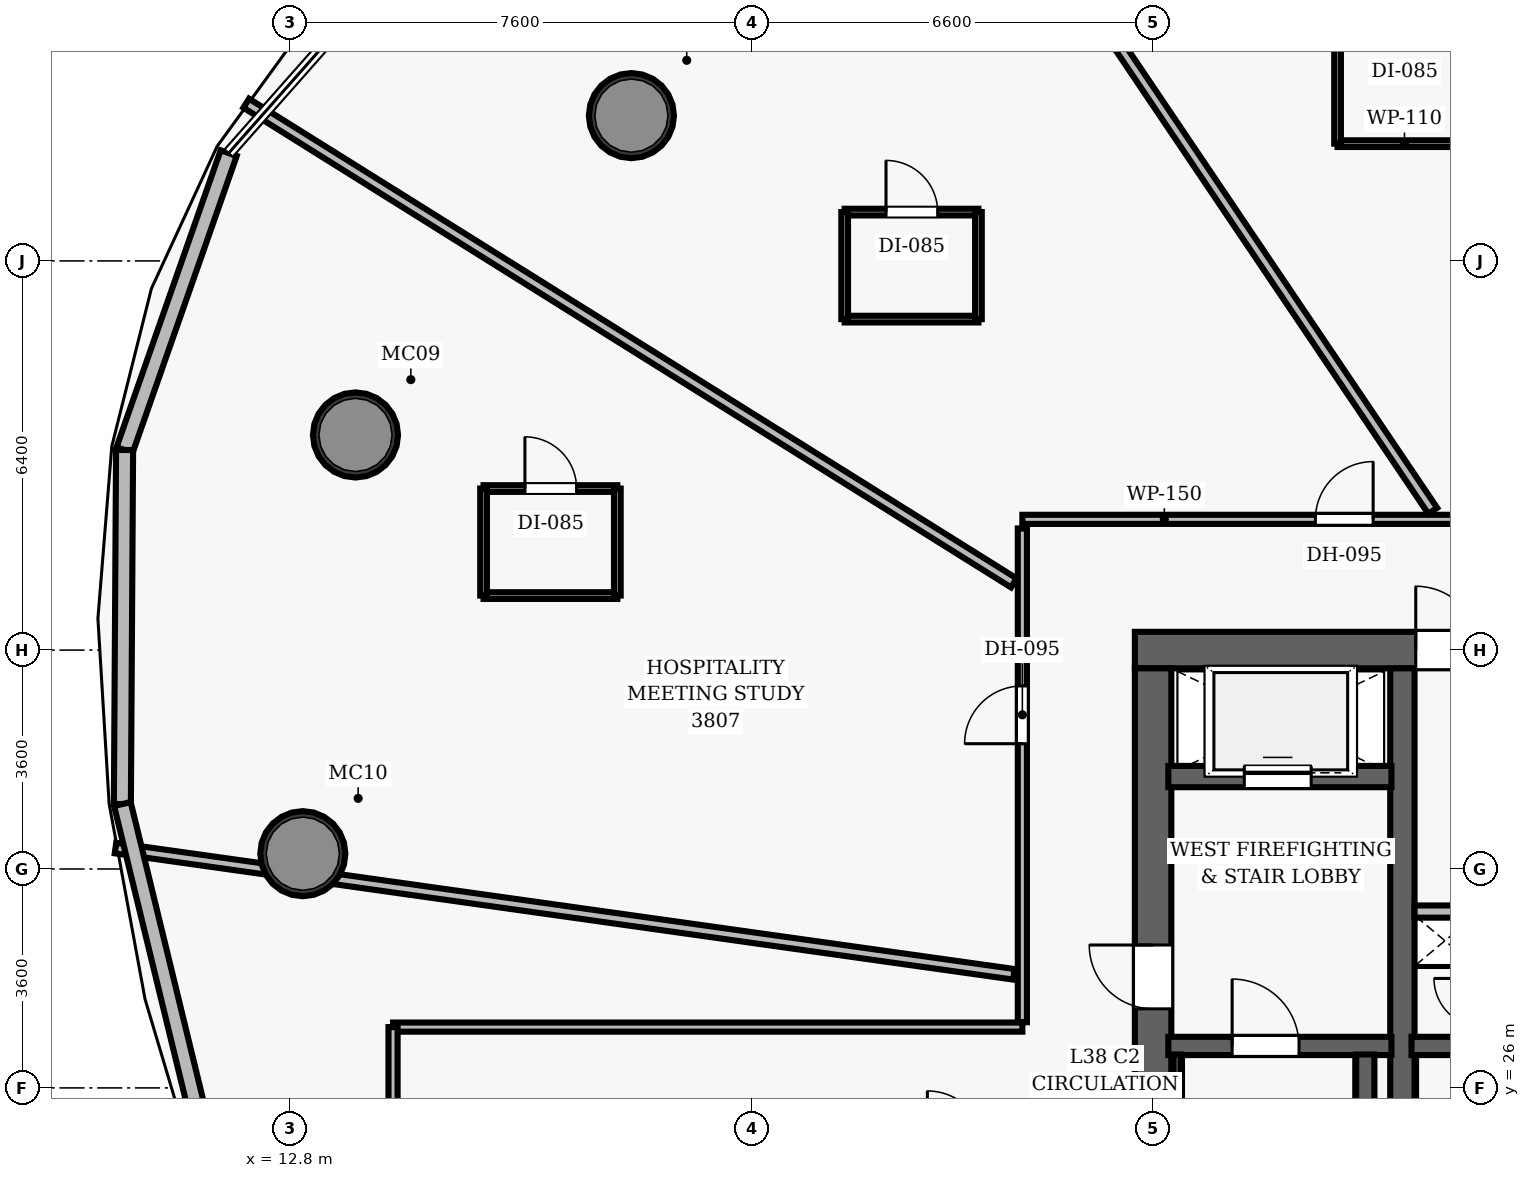
"""IFC4 building model, lengths in metres.
Left out: names, types, materials, properties, quantities, classifications, styles, units other than length and angle.
Written with IfcOpenShell. Run it as: python <this file> out.ifc"""

import sys

from ifc_helpers import new_model, si_unit, direction, frame, frame_2d, origin, origin_2d, place, context, subcontext, project, spatial, rectangle, hollow_circle, extrude, element, fill, save


model = new_model("IFC4")
c1 = context("Model", 3, precision=1e-05, world=origin(), true_north=direction((0.0, 1.0)))
c2 = subcontext(c1, "Body", "Model", "MODEL_VIEW")
j1 = project(units=[si_unit("LENGTHUNIT", "METRE"), si_unit("PLANEANGLEUNIT", "RADIAN")], contexts=[c1])
p1 = place(None, origin())
s1 = spatial("IfcSite", under=j1, at=p1, CompositionType="ELEMENT")
p2 = place(p1, origin())
s2 = spatial("IfcBuilding", under=s1, at=p2, CompositionType="ELEMENT")
p3 = place(p2, frame((0.0, 0.0, 151.8)))
s3 = spatial("IfcBuildingStorey", under=s2, at=p3, CompositionType="ELEMENT", Elevation=151.8)
p4 = place(p3, frame((26.7, 33.2, 0.0), z_axis=(0.0, 0.0, 1.0), x_axis=(1.0, 0.0, 0.0)))
e1 = element("IfcWall", 1, at=p4, inside=s3, PredefinedType="SHEAR", context=c2, shape_type="SweptSolid", body=[
    extrude(rectangle(XDim=22.6, YDim=0.6, at=frame_2d((11.3, 0.0))), origin(), (0.0, 0.0, 1.0), 3.5),
])
p5 = place(p4, frame((4.62, 0.0, 0.0)))
e2 = element("IfcOpeningElement", 2, at=p5, cuts=e1, PredefinedType="OPENING", context=c2, shape_type="SweptSolid", body=[
    extrude(rectangle(XDim=1.05, YDim=2.15, at=frame_2d((0.525, 1.075))), frame((0.0, 0.31, 0.0), z_axis=(0.0, -1.0, 0.0), x_axis=(1.0, 0.0, 0.0)), (0.0, 0.0, 1.0), 0.62),
])
p6 = place(p4, frame((14.52, 0.0, 0.0)))
e3 = element("IfcOpeningElement", 3, at=p6, cuts=e1, PredefinedType="OPENING", context=c2, shape_type="SweptSolid", body=[
    extrude(rectangle(XDim=1.05, YDim=2.15, at=frame_2d((0.525, 1.075))), frame((0.0, 0.31, 0.0), z_axis=(0.0, -1.0, 0.0), x_axis=(1.0, 0.0, 0.0)), (0.0, 0.0, 1.0), 0.62),
])
p7 = place(p3, frame((27.0, 19.1, 0.0), z_axis=(0.0, 0.0, 1.0), x_axis=(0.0, 1.0, 0.0)))
e4 = element("IfcWall", 4, at=p7, inside=s3, PredefinedType="SHEAR", context=c2, shape_type="SweptSolid", body=[
    extrude(rectangle(XDim=13.8, YDim=0.6, at=frame_2d((6.9, 0.0))), origin(), (0.0, 0.0, 1.0), 3.5),
])
p8 = place(p7, frame((8.2, 0.0, 0.0)))
e5 = element("IfcOpeningElement", 5, at=p8, cuts=e4, PredefinedType="OPENING", context=c2, shape_type="SweptSolid", body=[
    extrude(rectangle(XDim=1.05, YDim=2.15, at=frame_2d((0.525, 1.075))), frame((0.0, 0.31, 0.0), z_axis=(0.0, -1.0, 0.0), x_axis=(1.0, 0.0, 0.0)), (0.0, 0.0, 1.0), 0.62),
])
p9 = place(p3, frame((31.1, 19.1, 0.0), z_axis=(0.0, 0.0, 1.0), x_axis=(0.0, 1.0, 0.0)))
e6 = element("IfcWall", 6, at=p9, inside=s3, PredefinedType="SHEAR", context=c2, shape_type="SweptSolid", body=[
    extrude(rectangle(XDim=13.8, YDim=0.4, at=frame_2d((6.9, 0.0))), origin(), (0.0, 0.0, 1.0), 3.5),
])
for number, where, z_axis, x_axis in (
    (7, (18.42, 41.989, 0.0), (0.0, 0.0, 1.0), (1.0, 0.0, 0.0)),
    (8, (13.882, 36.738, 0.0), (0.0, 0.0, 1.0), (1.0, 0.0, 0.0)),
    (9, (13.016, 29.852, 0.0), (0.0, 0.0, 1.0), (1.0, 0.0, 0.0)),
):
    element("IfcColumn", number, at=place(p3, frame(where, z_axis=z_axis, x_axis=x_axis)), inside=s3, PredefinedType="COLUMN", context=c2, shape_type="SweptSolid", body=[
        extrude(hollow_circle(Radius=0.7, WallThickness=0.055, at=origin_2d()), origin(), (0.0, 0.0, 1.0), 3.5),
    ])
p10 = place(p3, frame((27.25, 26.69, 0.0), z_axis=(0.0, 0.0, 1.0), x_axis=(1.0, 0.0, 0.0)))
e10 = element("IfcWall", 10, at=p10, inside=s3, PredefinedType="SHEAR", context=c2, shape_type="SweptSolid", body=[
    extrude(rectangle(XDim=3.67, YDim=0.3, at=frame_2d((1.835, 0.0))), origin(), (0.0, 0.0, 1.0), 3.5),
])
p11 = place(p10, frame((1.05, 0.0, 0.0)))
e11 = element("IfcOpeningElement", 11, at=p11, cuts=e10, PredefinedType="OPENING", context=c2, shape_type="SweptSolid", body=[
    extrude(rectangle(XDim=1.1, YDim=2.15, at=frame_2d((0.55, 1.075))), frame((0.0, 0.16, 0.0), z_axis=(0.0, -1.0, 0.0), x_axis=(1.0, 0.0, 0.0)), (0.0, 0.0, 1.0), 0.32),
])
p12 = place(p3, frame((30.49, 19.05, 0.0), z_axis=(0.0, 0.0, 1.0), x_axis=(0.0, 1.0, 0.0)))
e12 = element("IfcWall", 12, at=p12, inside=s3, PredefinedType="SHEAR", context=c2, shape_type="SweptSolid", body=[
    extrude(rectangle(XDim=7.5, YDim=0.3, at=frame_2d((3.75, 0.0))), origin(), (0.0, 0.0, 1.0), 3.5),
])
p13 = place(p3, frame((27.395, 19.1, 0.0), z_axis=(0.0, 0.0, 1.0), x_axis=(0.0, 1.0, 0.0)))
e13 = element("IfcWall", 13, at=p13, inside=s3, PredefinedType="SHEAR", context=c2, shape_type="SweptSolid", body=[
    extrude(rectangle(XDim=7.45, YDim=0.12, at=frame_2d((3.725, 0.0))), origin(), (0.0, 0.0, 1.0), 3.5),
])
p14 = place(p3, frame((27.25, 31.12, 0.0), z_axis=(0.0, 0.0, 1.0), x_axis=(1.0, 0.0, 0.0)))
e14 = element("IfcWall", 14, at=p14, inside=s3, PredefinedType="SHEAR", context=c2, shape_type="SweptSolid", body=[
    extrude(rectangle(XDim=3.67, YDim=0.35, at=frame_2d((1.835, 0.0))), origin(), (0.0, 0.0, 1.0), 2.675),
])
p15 = place(p14, frame((1.25, 0.0, 0.0)))
e15 = element("IfcOpeningElement", 15, at=p15, cuts=e14, PredefinedType="OPENING", context=c2, shape_type="SweptSolid", body=[
    extrude(rectangle(XDim=1.1, YDim=2.15, at=frame_2d((0.55, 1.075))), frame((0.0, 0.185, 0.0), z_axis=(0.0, -1.0, 0.0), x_axis=(1.0, 0.0, 0.0)), (0.0, 0.0, 1.0), 0.37),
])
p16 = place(p3, frame((31.25, 26.69, 0.0), z_axis=(0.0, 0.0, 1.0), x_axis=(1.0, 0.0, 0.0)))
e16 = element("IfcWall", 16, at=p16, inside=s3, PredefinedType="SHEAR", context=c2, shape_type="SweptSolid", body=[
    extrude(rectangle(XDim=3.56, YDim=0.3, at=frame_2d((1.78, 0.0))), origin(), (0.0, 0.0, 1.0), 3.5),
])
p17 = place(p16, frame((1.55, 0.0, 0.0)))
e17 = element("IfcOpeningElement", 17, at=p17, cuts=e16, PredefinedType="OPENING", context=c2, shape_type="SweptSolid", body=[
    extrude(rectangle(XDim=1.1, YDim=2.15, at=frame_2d((0.55, 1.075))), frame((0.0, 0.16, 0.0), z_axis=(0.0, -1.0, 0.0), x_axis=(1.0, 0.0, 0.0)), (0.0, 0.0, 1.0), 0.32),
])
p18 = place(p3, frame((31.3, 28.9, 0.0), z_axis=(0.0, 0.0, 1.0), x_axis=(1.0, 0.0, 0.0)))
e18 = element("IfcWall", 18, at=p18, inside=s3, PredefinedType="PARTITIONING", context=c2, shape_type="SweptSolid", body=[
    extrude(rectangle(XDim=1.12, YDim=0.2, at=frame_2d((0.56, 0.0))), origin(), (0.0, 0.0, 1.0), 2.675),
])
p19 = place(p3, frame((24.85, 35.35, 0.0), z_axis=(0.0, 0.0, 1.0), x_axis=(1.0, 0.0, 0.0)))
e19 = element("IfcWall", 19, at=p19, inside=s3, PredefinedType="PARTITIONING", context=c2, shape_type="SweptSolid", body=[
    extrude(rectangle(XDim=26.0, YDim=0.15, at=frame_2d((13.0, 0.0))), origin(), (0.0, 0.0, 1.0), 2.675),
])
p20 = place(p19, frame((21.789, 0.0, 0.0)))
e20 = element("IfcOpeningElement", 20, at=p20, cuts=e19, PredefinedType="OPENING", context=c2, shape_type="SweptSolid", body=[
    extrude(rectangle(XDim=0.95, YDim=2.15, at=frame_2d((0.475, 1.075))), frame((0.0, 0.085, 0.0), z_axis=(0.0, -1.0, 0.0), x_axis=(1.0, 0.0, 0.0)), (0.0, 0.0, 1.0), 0.17),
])
p21 = place(p19, frame((16.151, 0.0, 0.0)))
e21 = element("IfcOpeningElement", 21, at=p21, cuts=e19, PredefinedType="OPENING", context=c2, shape_type="SweptSolid", body=[
    extrude(rectangle(XDim=0.95, YDim=2.15, at=frame_2d((0.475, 1.075))), frame((0.0, 0.085, 0.0), z_axis=(0.0, -1.0, 0.0), x_axis=(1.0, 0.0, 0.0)), (0.0, 0.0, 1.0), 0.17),
])
p22 = place(p19, frame((13.021, 0.0, 0.0)))
e22 = element("IfcOpeningElement", 22, at=p22, cuts=e19, PredefinedType="OPENING", context=c2, shape_type="SweptSolid", body=[
    extrude(rectangle(XDim=0.95, YDim=2.15, at=frame_2d((0.475, 1.075))), frame((0.0, 0.085, 0.0), z_axis=(0.0, -1.0, 0.0), x_axis=(1.0, 0.0, 0.0)), (0.0, 0.0, 1.0), 0.17),
])
p23 = place(p19, frame((9.972, 0.0, 0.0)))
e23 = element("IfcOpeningElement", 23, at=p23, cuts=e19, PredefinedType="OPENING", context=c2, shape_type="SweptSolid", body=[
    extrude(rectangle(XDim=0.95, YDim=2.15, at=frame_2d((0.475, 1.075))), frame((0.0, 0.085, 0.0), z_axis=(0.0, -1.0, 0.0), x_axis=(1.0, 0.0, 0.0)), (0.0, 0.0, 1.0), 0.17),
])
p24 = place(p19, frame((4.819, 0.0, 0.0)))
e24 = element("IfcOpeningElement", 24, at=p24, cuts=e19, PredefinedType="OPENING", context=c2, shape_type="SweptSolid", body=[
    extrude(rectangle(XDim=0.95, YDim=2.15, at=frame_2d((0.475, 1.075))), frame((0.0, 0.085, 0.0), z_axis=(0.0, -1.0, 0.0), x_axis=(1.0, 0.0, 0.0)), (0.0, 0.0, 1.0), 0.17),
])
p25 = place(p3, frame((24.85, 27.08, 0.0), z_axis=(0.0, 0.0, 1.0), x_axis=(0.0, 1.0, 0.0)))
e25 = element("IfcWall", 25, at=p25, inside=s3, PredefinedType="PARTITIONING", context=c2, shape_type="SweptSolid", body=[
    extrude(rectangle(XDim=8.12, YDim=0.15, at=frame_2d((4.06, 0.0))), origin(), (0.0, 0.0, 1.0), 2.675),
])
p26 = place(p25, frame((4.58, 0.0, 0.0)))
e26 = element("IfcOpeningElement", 26, at=p26, cuts=e25, PredefinedType="OPENING", context=c2, shape_type="SweptSolid", body=[
    extrude(rectangle(XDim=0.95, YDim=2.15, at=frame_2d((0.475, 1.075))), frame((0.0, 0.085, 0.0), z_axis=(0.0, -1.0, 0.0), x_axis=(1.0, 0.0, 0.0)), (0.0, 0.0, 1.0), 0.17),
])
p27 = place(p3, frame((14.5, 27.0, 0.0), z_axis=(0.0, 0.0, 1.0), x_axis=(1.0, 0.0, 0.0)))
e27 = element("IfcWall", 27, at=p27, inside=s3, PredefinedType="PARTITIONING", context=c2, shape_type="SweptSolid", body=[
    extrude(rectangle(XDim=10.35, YDim=0.15, at=frame_2d((5.175, 0.0))), origin(), (0.0, 0.0, 1.0), 2.675),
])
p28 = place(p3, frame((14.5, 25.0, 0.0), z_axis=(0.0, 0.0, 1.0), x_axis=(0.0, 1.0, 0.0)))
e28 = element("IfcWall", 28, at=p28, inside=s3, PredefinedType="PARTITIONING", context=c2, shape_type="SweptSolid", body=[
    extrude(rectangle(XDim=2.0, YDim=0.15, at=frame_2d((1.0, 0.0))), origin(), (0.0, 0.0, 1.0), 2.675),
])
p29 = place(p3, frame((31.599, 35.49, 0.0), z_axis=(0.0, 0.0, 1.0), x_axis=(-0.559190390753, 0.829039267399, 0.0)))
e29 = element("IfcWall", 29, at=p29, inside=s3, PredefinedType="PARTITIONING", context=c2, shape_type="SweptSolid", body=[
    extrude(rectangle(XDim=16.42, YDim=0.175, at=frame_2d((8.21, 0.0))), origin(), (0.0, 0.0, 1.0), 2.675),
])
p30 = place(p3, frame((24.71, 34.304, 0.0), z_axis=(0.0, 0.0, 1.0), x_axis=(-0.848045288599, 0.529923757237, 0.0)))
e30 = element("IfcWall", 30, at=p30, inside=s3, PredefinedType="PARTITIONING", context=c2, shape_type="SweptSolid", body=[
    extrude(rectangle(XDim=14.887, YDim=0.175, at=frame_2d((7.443, 0.0))), origin(), (0.0, 0.0, 1.0), 2.675),
])
p31 = place(p3, frame((24.71, 27.868, 0.0), z_axis=(0.0, 0.0, 1.0), x_axis=(-0.990268949967, 0.139166830573, 0.0)))
e31 = element("IfcWall", 31, at=p31, inside=s3, PredefinedType="PARTITIONING", context=c2, shape_type="SweptSolid", body=[
    extrude(rectangle(XDim=14.92, YDim=0.175, at=frame_2d((7.46, 0.0))), origin(), (0.0, 0.0, 1.0), 2.675),
])
p32 = place(p3, frame((30.034, 41.529, 0.0), z_axis=(0.0, 0.0, 1.0), x_axis=(1.0, 0.0, 0.0)))
e32 = element("IfcWall", 32, at=p32, inside=s3, PredefinedType="PARTITIONING", context=c2, shape_type="SweptSolid", body=[
    extrude(rectangle(XDim=2.2, YDim=0.11, at=frame_2d((1.1, 0.0))), origin(), (0.0, 0.0, 1.0), 2.675),
])
p33 = place(p3, frame((30.034, 41.529, 0.0), z_axis=(0.0, 0.0, 1.0), x_axis=(0.0, 1.0, 0.0)))
e33 = element("IfcWall", 33, at=p33, inside=s3, PredefinedType="PARTITIONING", context=c2, shape_type="SweptSolid", body=[
    extrude(rectangle(XDim=1.76, YDim=0.11, at=frame_2d((0.88, 0.0))), origin(), (0.0, 0.0, 1.0), 2.675),
])
p34 = place(p3, frame((21.927, 38.643, 0.0), z_axis=(0.0, 0.0, 1.0), x_axis=(1.0, 0.0, 0.0)))
e34 = element("IfcWall", 34, at=p34, inside=s3, PredefinedType="PARTITIONING", context=c2, shape_type="SweptSolid", body=[
    extrude(rectangle(XDim=2.2, YDim=0.11, at=frame_2d((1.1, 0.0))), origin(), (0.0, 0.0, 1.0), 2.675),
])
p35 = place(p3, frame((21.927, 40.403, 0.0), z_axis=(0.0, 0.0, 1.0), x_axis=(1.0, 0.0, 0.0)))
e35 = element("IfcWall", 35, at=p35, inside=s3, PredefinedType="PARTITIONING", context=c2, shape_type="SweptSolid", body=[
    extrude(rectangle(XDim=2.2, YDim=0.11, at=frame_2d((1.1, 0.0))), origin(), (0.0, 0.0, 1.0), 2.675),
])
p36 = place(p35, frame((0.68, 0.0, 0.0)))
e36 = element("IfcOpeningElement", 36, at=p36, cuts=e35, PredefinedType="OPENING", context=c2, shape_type="SweptSolid", body=[
    extrude(rectangle(XDim=0.85, YDim=2.1, at=frame_2d((0.425, 1.05))), frame((0.0, 0.065, 0.0), z_axis=(0.0, -1.0, 0.0), x_axis=(1.0, 0.0, 0.0)), (0.0, 0.0, 1.0), 0.13),
])
for number, where, z_axis, x_axis in (
    (37, (21.927, 38.643, 0.0), (0.0, 0.0, 1.0), (0.0, 1.0, 0.0)),
    (38, (24.127, 38.643, 0.0), (0.0, 0.0, 1.0), (0.0, 1.0, 0.0)),
):
    element("IfcWall", number, at=place(p3, frame(where, z_axis=z_axis, x_axis=x_axis)), inside=s3, PredefinedType="PARTITIONING", context=c2, shape_type="SweptSolid", body=[
        extrude(rectangle(XDim=1.76, YDim=0.11, at=frame_2d((0.88, 0.0))), origin(), (0.0, 0.0, 1.0), 2.675),
    ])
p37 = place(p3, frame((15.989, 34.097, 0.0), z_axis=(0.0, 0.0, 1.0), x_axis=(1.0, 0.0, 0.0)))
e39 = element("IfcWall", 39, at=p37, inside=s3, PredefinedType="PARTITIONING", context=c2, shape_type="SweptSolid", body=[
    extrude(rectangle(XDim=2.2, YDim=0.11, at=frame_2d((1.1, 0.0))), origin(), (0.0, 0.0, 1.0), 2.675),
])
p38 = place(p3, frame((15.989, 35.857, 0.0), z_axis=(0.0, 0.0, 1.0), x_axis=(1.0, 0.0, 0.0)))
e40 = element("IfcWall", 40, at=p38, inside=s3, PredefinedType="PARTITIONING", context=c2, shape_type="SweptSolid", body=[
    extrude(rectangle(XDim=2.2, YDim=0.11, at=frame_2d((1.1, 0.0))), origin(), (0.0, 0.0, 1.0), 2.675),
])
p39 = place(p38, frame((0.68, 0.0, 0.0)))
e41 = element("IfcOpeningElement", 41, at=p39, cuts=e40, PredefinedType="OPENING", context=c2, shape_type="SweptSolid", body=[
    extrude(rectangle(XDim=0.85, YDim=2.1, at=frame_2d((0.425, 1.05))), frame((0.0, 0.065, 0.0), z_axis=(0.0, -1.0, 0.0), x_axis=(1.0, 0.0, 0.0)), (0.0, 0.0, 1.0), 0.13),
])
for number, where, z_axis, x_axis in (
    (42, (15.989, 34.097, 0.0), (0.0, 0.0, 1.0), (0.0, 1.0, 0.0)),
    (43, (18.189, 34.097, 0.0), (0.0, 0.0, 1.0), (0.0, 1.0, 0.0)),
):
    element("IfcWall", number, at=place(p3, frame(where, z_axis=z_axis, x_axis=x_axis)), inside=s3, PredefinedType="PARTITIONING", context=c2, shape_type="SweptSolid", body=[
        extrude(rectangle(XDim=1.76, YDim=0.11, at=frame_2d((0.88, 0.0))), origin(), (0.0, 0.0, 1.0), 2.675),
    ])
p40 = place(p3, frame((10.085, 36.49, 0.0), z_axis=(0.0, 0.0, 1.0), x_axis=(0.330896813474, 0.943666942747, 0.0)))
e44 = element("IfcWall", 44, at=p40, inside=s3, PredefinedType="SOLIDWALL", context=c2, shape_type="SweptSolid", body=[
    extrude(rectangle(XDim=5.174, YDim=0.28, at=frame_2d((2.587, 0.0))), origin(), (0.0, 0.0, 1.0), 3.26),
])
p41 = place(p3, frame((10.049, 30.668, 0.0), z_axis=(0.0, 0.0, 1.0), x_axis=(0.006205331259, 0.999980746747, 0.0)))
e45 = element("IfcWall", 45, at=p41, inside=s3, PredefinedType="SOLIDWALL", context=c2, shape_type="SweptSolid", body=[
    extrude(rectangle(XDim=5.823, YDim=0.28, at=frame_2d((2.911, 0.0))), origin(), (0.0, 0.0, 1.0), 3.26),
])
p42 = place(p3, frame((11.625, 24.192, 0.0), z_axis=(0.0, 0.0, 1.0), x_axis=(-0.236592723123, 0.971608914824, 0.0)))
e46 = element("IfcWall", 46, at=p42, inside=s3, PredefinedType="SOLIDWALL", context=c2, shape_type="SweptSolid", body=[
    extrude(rectangle(XDim=6.665, YDim=0.28, at=frame_2d((3.333, 0.0))), origin(), (0.0, 0.0, 1.0), 3.26),
])
p43 = place(p11, origin())
e47 = element("IfcDoor", 47, at=p43, inside=s3, OperationType="SINGLE_SWING_LEFT", PredefinedType="DOOR", context=c2, shape_type="SweptSolid", body=[
    extrude(rectangle(XDim=1.1, YDim=2.15, at=frame_2d((0.55, 1.075))), frame((0.0, 0.025, 0.0), z_axis=(0.0, -1.0, 0.0), x_axis=(1.0, 0.0, 0.0)), (0.0, 0.0, 1.0), 0.05),
])
fill(e11, e47)
p44 = place(p8, origin())
e48 = element("IfcDoor", 48, at=p44, inside=s3, OperationType="SINGLE_SWING_RIGHT", PredefinedType="DOOR", context=c2, shape_type="SweptSolid", body=[
    extrude(rectangle(XDim=1.05, YDim=2.15, at=frame_2d((0.525, 1.075))), frame((0.0, 0.025, 0.0), z_axis=(0.0, -1.0, 0.0), x_axis=(1.0, 0.0, 0.0)), (0.0, 0.0, 1.0), 0.05),
])
fill(e5, e48)
p45 = place(p5, origin())
e49 = element("IfcDoor", 49, at=p45, inside=s3, OperationType="SINGLE_SWING_LEFT", PredefinedType="DOOR", context=c2, shape_type="SweptSolid", body=[
    extrude(rectangle(XDim=1.05, YDim=2.15, at=frame_2d((0.525, 1.075))), frame((0.0, 0.025, 0.0), z_axis=(0.0, -1.0, 0.0), x_axis=(1.0, 0.0, 0.0)), (0.0, 0.0, 1.0), 0.05),
])
fill(e2, e49)
p46 = place(p24, origin())
e50 = element("IfcDoor", 50, at=p46, inside=s3, OperationType="SINGLE_SWING_RIGHT", PredefinedType="DOOR", context=c2, shape_type="SweptSolid", body=[
    extrude(rectangle(XDim=0.95, YDim=2.15, at=frame_2d((0.475, 1.075))), frame((0.0, 0.025, 0.0), z_axis=(0.0, -1.0, 0.0), x_axis=(1.0, 0.0, 0.0)), (0.0, 0.0, 1.0), 0.05),
])
fill(e24, e50)
p47 = place(p36, origin())
e51 = element("IfcDoor", 51, at=p47, inside=s3, OperationType="SINGLE_SWING_LEFT", PredefinedType="DOOR", context=c2, shape_type="SweptSolid", body=[
    extrude(rectangle(XDim=0.85, YDim=2.1, at=frame_2d((0.425, 1.05))), frame((0.0, 0.025, 0.0), z_axis=(0.0, -1.0, 0.0), x_axis=(1.0, 0.0, 0.0)), (0.0, 0.0, 1.0), 0.05),
])
fill(e36, e51)
p48 = place(p26, origin())
e52 = element("IfcDoor", 52, at=p48, inside=s3, OperationType="SINGLE_SWING_LEFT", PredefinedType="DOOR", context=c2, shape_type="SweptSolid", body=[
    extrude(rectangle(XDim=0.95, YDim=2.15, at=frame_2d((0.475, 1.075))), frame((0.0, 0.025, 0.0), z_axis=(0.0, -1.0, 0.0), x_axis=(1.0, 0.0, 0.0)), (0.0, 0.0, 1.0), 0.05),
])
fill(e26, e52)
p49 = place(p39, origin())
e53 = element("IfcDoor", 53, at=p49, inside=s3, OperationType="SINGLE_SWING_LEFT", PredefinedType="DOOR", context=c2, shape_type="SweptSolid", body=[
    extrude(rectangle(XDim=0.85, YDim=2.1, at=frame_2d((0.425, 1.05))), frame((0.0, 0.025, 0.0), z_axis=(0.0, -1.0, 0.0), x_axis=(1.0, 0.0, 0.0)), (0.0, 0.0, 1.0), 0.05),
])
fill(e41, e53)
p50 = place(p15, origin())
e54 = element("IfcDoor", 54, at=p50, inside=s3, OperationType="SLIDING_TO_LEFT", PredefinedType="DOOR", context=c2, shape_type="SweptSolid", body=[
    extrude(rectangle(XDim=1.1, YDim=2.15, at=frame_2d((0.55, 1.075))), frame((0.0, 0.025, 0.0), z_axis=(0.0, -1.0, 0.0), x_axis=(1.0, 0.0, 0.0)), (0.0, 0.0, 1.0), 0.05),
])
fill(e15, e54)
save(model, sys.argv[1])
